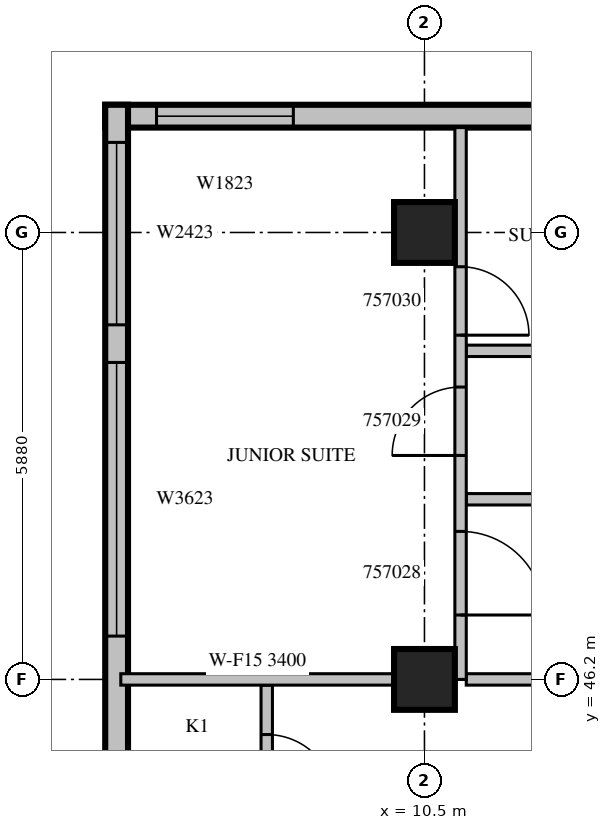
"""IFC4 building model, lengths in metres.
Left out: names, types, materials, properties, quantities, classifications, styles, units other than length and angle.
Written with IfcOpenShell. Run it as: python <this file> out.ifc"""

import sys

from ifc_helpers import new_model, si_unit, direction, frame, frame_2d, origin, origin_2d, place, context, subcontext, project, spatial, rectangle, extrude, source, transform, mapped, element, fill, save


model = new_model("IFC4")
c1 = context("Model", 3, precision=1e-05, world=origin(), true_north=direction((0.0, 1.0)))
c2 = subcontext(c1, "Body", "Model", "MODEL_VIEW")
j1 = project(units=[si_unit("LENGTHUNIT", "METRE"), si_unit("PLANEANGLEUNIT", "RADIAN")], contexts=[c1])
p1 = place(None, origin())
s1 = spatial("IfcSite", under=j1, at=p1, CompositionType="ELEMENT")
p2 = place(p1, origin())
s2 = spatial("IfcBuilding", under=s1, at=p2, CompositionType="ELEMENT")
p3 = place(p2, frame((0.0, 0.0, 250.0)))
s3 = spatial("IfcBuildingStorey", under=s2, at=p3, CompositionType="ELEMENT", Elevation=250.0)
m1 = source(origin(), c2, "Body", "SweptSolid", [
    extrude(rectangle(XDim=0.8, YDim=0.8, at=origin_2d()), origin(), (0.0, 0.0, 1.0), 3.8),
])
for number, where, z_axis, x_axis in (
    (1, (10.5, 46.2, 0.0), (0.0, 0.0, 1.0), (1.0, 0.0, 0.0)),
    (2, (10.5, 52.08, 0.0), (0.0, 0.0, 1.0), (1.0, 0.0, 0.0)),
):
    element("IfcColumn", number, at=place(p3, frame(where, z_axis=z_axis, x_axis=x_axis)), inside=s3, PredefinedType="COLUMN", context=c2, shape_type="MappedRepresentation", body=[
        mapped(m1, transform((0.0, 0.0, 0.0), scale=1.0)),
    ])
m2 = source(origin(), c2, "Body", "SweptSolid", [
    extrude(rectangle(XDim=10.5, YDim=0.3, at=frame_2d((5.25, 0.0))), origin(), (0.0, 0.0, 1.0), 3.4),
])
p4 = place(p3, frame((16.8, 53.61, 0.0), z_axis=(0.0, 0.0, 1.0), x_axis=(-1.0, 0.0, 0.0)))
e3 = element("IfcWall", 3, at=p4, inside=s3, PredefinedType="STANDARD", context=c2, shape_type="MappedRepresentation", body=[
    mapped(m2, transform((0.0, 0.0, 0.0), scale=1.0)),
])
m3 = source(origin(), c2, "Body", "SweptSolid", [
    extrude(rectangle(XDim=1.2, YDim=2.3, at=frame_2d((0.6, 1.15))), frame((0.0, 0.16, 0.0), z_axis=(0.0, -1.0, 0.0), x_axis=(1.0, 0.0, 0.0)), (0.0, 0.0, 1.0), 0.32),
])
p5 = place(p4, frame((2.15, 0.0, 0.6)))
e4 = element("IfcOpeningElement", 4, at=p5, cuts=e3, PredefinedType="OPENING", context=c2, shape_type="MappedRepresentation", body=[
    mapped(m3, transform((0.0, 0.0, 0.0), scale=1.0)),
])
m4 = source(origin(), c2, "Body", "SweptSolid", [
    extrude(rectangle(XDim=1.8, YDim=2.3, at=frame_2d((0.9, 1.15))), frame((0.0, 0.16, 0.0), z_axis=(0.0, -1.0, 0.0), x_axis=(1.0, 0.0, 0.0)), (0.0, 0.0, 1.0), 0.32),
])
p6 = place(p4, frame((8.025, 0.0, 0.6)))
e5 = element("IfcOpeningElement", 5, at=p6, cuts=e3, PredefinedType="OPENING", context=c2, shape_type="MappedRepresentation", body=[
    mapped(m4, transform((0.0, 0.0, 0.0), scale=1.0)),
])
m5 = source(origin(), c2, "Body", "SweptSolid", [
    extrude(rectangle(XDim=9.91, YDim=0.3, at=frame_2d((4.955, 0.0))), origin(), (0.0, 0.0, 1.0), 3.4),
])
p7 = place(p3, frame((6.45, 53.76, 0.0), z_axis=(0.0, 0.0, 1.0), x_axis=(0.0, -1.0, 0.0)))
e6 = element("IfcWall", 6, at=p7, inside=s3, PredefinedType="STANDARD", context=c2, shape_type="MappedRepresentation", body=[
    mapped(m5, transform((0.0, 0.0, 0.0), scale=1.0)),
])
m6 = source(origin(), c2, "Body", "SweptSolid", [
    extrude(rectangle(XDim=3.6, YDim=2.3, at=frame_2d((1.8, 1.15))), frame((0.0, 0.16, 0.0), z_axis=(0.0, -1.0, 0.0), x_axis=(1.0, 0.0, 0.0)), (0.0, 0.0, 1.0), 0.32),
])
p8 = place(p7, frame((3.39, 0.0, 0.6)))
e7 = element("IfcOpeningElement", 7, at=p8, cuts=e6, PredefinedType="OPENING", context=c2, shape_type="MappedRepresentation", body=[
    mapped(m6, transform((0.0, 0.0, 0.0), scale=1.0)),
])
m7 = source(origin(), c2, "Body", "SweptSolid", [
    extrude(rectangle(XDim=2.4, YDim=2.3, at=frame_2d((1.2, 1.15))), frame((0.0, 0.16, 0.0), z_axis=(0.0, -1.0, 0.0), x_axis=(1.0, 0.0, 0.0)), (0.0, 0.0, 1.0), 0.32),
])
p9 = place(p7, frame((0.495, 0.0, 0.6)))
e8 = element("IfcOpeningElement", 8, at=p9, cuts=e6, PredefinedType="OPENING", context=c2, shape_type="MappedRepresentation", body=[
    mapped(m7, transform((0.0, 0.0, 0.0), scale=1.0)),
])
m8 = source(origin(), c2, "Body", "SweptSolid", [
    extrude(rectangle(XDim=2.2, YDim=0.15, at=frame_2d((1.1, 0.0))), origin(), (0.0, 0.0, 1.0), 3.4),
])
p10 = place(p3, frame((8.425, 43.925, 0.0), z_axis=(0.0, 0.0, 1.0), x_axis=(0.0, 1.0, 0.0)))
e9 = element("IfcWall", 9, at=p10, inside=s3, PredefinedType="PARTITIONING", context=c2, shape_type="MappedRepresentation", body=[
    mapped(m8, transform((0.0, 0.0, 0.0), scale=1.0)),
])
m9 = source(origin(), c2, "Body", "SweptSolid", [
    extrude(rectangle(XDim=0.9, YDim=2.1, at=frame_2d((0.45, 1.05))), frame((0.0, 0.085, 0.0), z_axis=(0.0, -1.0, 0.0), x_axis=(1.0, 0.0, 0.0)), (0.0, 0.0, 1.0), 0.17),
])
p11 = place(p10, frame((0.65, 0.0, 0.0)))
e10 = element("IfcOpeningElement", 10, at=p11, cuts=e9, PredefinedType="OPENING", context=c2, shape_type="MappedRepresentation", body=[
    mapped(m9, transform((0.0, 0.0, 0.0), scale=1.0)),
])
m10 = source(origin(), c2, "Body", "SweptSolid", [
    extrude(rectangle(XDim=3.95, YDim=0.15, at=frame_2d((1.975, 0.0))), origin(), (0.0, 0.0, 1.0), 3.4),
])
for number, where, z_axis, x_axis in (
    (11, (15.0, 48.57, 0.0), (0.0, 0.0, 1.0), (-1.0, 0.0, 0.0)),
    (12, (15.0, 50.523, 0.0), (0.0, 0.0, 1.0), (-1.0, 0.0, 0.0)),
):
    element("IfcWall", number, at=place(p3, frame(where, z_axis=z_axis, x_axis=x_axis)), inside=s3, PredefinedType="PARTITIONING", context=c2, shape_type="MappedRepresentation", body=[
        mapped(m10, transform((0.0, 0.0, 0.0), scale=1.0)),
    ])
m11 = source(origin(), c2, "Body", "SweptSolid", [
    extrude(rectangle(XDim=3.596, YDim=0.15, at=frame_2d((1.798, 0.0))), origin(), (0.0, 0.0, 1.0), 3.4),
])
p12 = place(p3, frame((10.101, 46.2, 0.0), z_axis=(0.0, 0.0, 1.0), x_axis=(-1.0, 0.0, 0.0)))
e13 = element("IfcWall", 13, at=p12, inside=s3, PredefinedType="PARTITIONING", context=c2, shape_type="MappedRepresentation", body=[
    mapped(m11, transform((0.0, 0.0, 0.0), scale=1.0)),
])
p13 = place(p3, frame((15.0, 46.2, 0.0), z_axis=(0.0, 0.0, 1.0), x_axis=(-1.0, 0.0, 0.0)))
e14 = element("IfcWall", 14, at=p13, inside=s3, PredefinedType="PARTITIONING", context=c2, shape_type="MappedRepresentation", body=[
    mapped(m10, transform((0.0, 0.0, 0.0), scale=1.0)),
])
m12 = source(origin(), c2, "Body", "SweptSolid", [
    extrude(rectangle(XDim=7.26, YDim=0.15, at=frame_2d((3.63, 0.0))), origin(), (0.0, 0.0, 1.0), 3.4),
])
p14 = place(p3, frame((10.975, 46.2, 0.0), z_axis=(0.0, 0.0, 1.0), x_axis=(0.0, 1.0, 0.0)))
e15 = element("IfcWall", 15, at=p14, inside=s3, PredefinedType="PARTITIONING", context=c2, shape_type="MappedRepresentation", body=[
    mapped(m12, transform((0.0, 0.0, 0.0), scale=1.0)),
])
m13 = source(origin(), c2, "Body", "SweptSolid", [
    extrude(rectangle(XDim=1.1, YDim=2.1, at=frame_2d((0.55, 1.05))), frame((0.0, 0.085, 0.0), z_axis=(0.0, -1.0, 0.0), x_axis=(1.0, 0.0, 0.0)), (0.0, 0.0, 1.0), 0.17),
])
p15 = place(p14, frame((0.847, 0.0, 0.0)))
e16 = element("IfcOpeningElement", 16, at=p15, cuts=e15, PredefinedType="OPENING", context=c2, shape_type="MappedRepresentation", body=[
    mapped(m13, transform((0.0, 0.0, 0.0), scale=1.0)),
])
p16 = place(p14, frame((2.946, 0.0, 0.0)))
e17 = element("IfcOpeningElement", 17, at=p16, cuts=e15, PredefinedType="OPENING", context=c2, shape_type="MappedRepresentation", body=[
    mapped(m9, transform((0.0, 0.0, 0.0), scale=1.0)),
])
p17 = place(p14, frame((4.529, 0.0, 0.0)))
e18 = element("IfcOpeningElement", 18, at=p17, cuts=e15, PredefinedType="OPENING", context=c2, shape_type="MappedRepresentation", body=[
    mapped(m9, transform((0.0, 0.0, 0.0), scale=1.0)),
])
m14 = source(origin(), c2, "Body", "SweptSolid", [
    extrude(rectangle(XDim=1.8, YDim=2.3, at=frame_2d((0.9, 1.15))), frame((0.0, 0.03, 0.0), z_axis=(0.0, -1.0, 0.0), x_axis=(1.0, 0.0, 0.0)), (0.0, 0.0, 1.0), 0.06),
])
p18 = place(p6, origin())
e19 = element("IfcWindow", 19, at=p18, inside=s3, PartitioningType="SINGLE_PANEL", PredefinedType="WINDOW", context=c2, shape_type="MappedRepresentation", body=[
    mapped(m14, transform((0.0, 0.0, 0.0), scale=1.0)),
])
fill(e5, e19)
m15 = source(origin(), c2, "Body", "SweptSolid", [
    extrude(rectangle(XDim=3.6, YDim=2.3, at=frame_2d((1.8, 1.15))), frame((0.0, 0.03, 0.0), z_axis=(0.0, -1.0, 0.0), x_axis=(1.0, 0.0, 0.0)), (0.0, 0.0, 1.0), 0.06),
])
p19 = place(p8, origin())
e20 = element("IfcWindow", 20, at=p19, inside=s3, PartitioningType="SINGLE_PANEL", PredefinedType="WINDOW", context=c2, shape_type="MappedRepresentation", body=[
    mapped(m15, transform((0.0, 0.0, 0.0), scale=1.0)),
])
fill(e7, e20)
m16 = source(origin(), c2, "Body", "SweptSolid", [
    extrude(rectangle(XDim=2.4, YDim=2.3, at=frame_2d((1.2, 1.15))), frame((0.0, 0.03, 0.0), z_axis=(0.0, -1.0, 0.0), x_axis=(1.0, 0.0, 0.0)), (0.0, 0.0, 1.0), 0.06),
])
p20 = place(p9, origin())
e21 = element("IfcWindow", 21, at=p20, inside=s3, PartitioningType="SINGLE_PANEL", PredefinedType="WINDOW", context=c2, shape_type="MappedRepresentation", body=[
    mapped(m16, transform((0.0, 0.0, 0.0), scale=1.0)),
])
fill(e8, e21)
m17 = source(origin(), c2, "Body", "SweptSolid", [
    extrude(rectangle(XDim=0.9, YDim=2.1, at=frame_2d((0.45, 1.05))), frame((0.0, 0.025, 0.0), z_axis=(0.0, -1.0, 0.0), x_axis=(1.0, 0.0, 0.0)), (0.0, 0.0, 1.0), 0.05),
])
p21 = place(p11, origin())
e22 = element("IfcDoor", 22, at=p21, inside=s3, OperationType="SINGLE_SWING_RIGHT", PredefinedType="DOOR", context=c2, shape_type="MappedRepresentation", body=[
    mapped(m17, transform((0.0, 0.0, 0.0), scale=1.0)),
])
fill(e10, e22)
m18 = source(origin(), c2, "Body", "SweptSolid", [
    extrude(rectangle(XDim=1.1, YDim=2.1, at=frame_2d((0.55, 1.05))), frame((0.0, 0.025, 0.0), z_axis=(0.0, -1.0, 0.0), x_axis=(1.0, 0.0, 0.0)), (0.0, 0.0, 1.0), 0.05),
])
p22 = place(p15, origin())
e23 = element("IfcDoor", 23, at=p22, inside=s3, OperationType="SINGLE_SWING_RIGHT", PredefinedType="DOOR", context=c2, shape_type="MappedRepresentation", body=[
    mapped(m18, transform((0.0, 0.0, 0.0), scale=1.0)),
])
fill(e16, e23)
p23 = place(p16, origin())
e24 = element("IfcDoor", 24, at=p23, inside=s3, OperationType="SINGLE_SWING_LEFT", PredefinedType="DOOR", context=c2, shape_type="MappedRepresentation", body=[
    mapped(m17, transform((0.0, 0.0, 0.0), scale=1.0)),
])
fill(e17, e24)
p24 = place(p17, origin())
e25 = element("IfcDoor", 25, at=p24, inside=s3, OperationType="SINGLE_SWING_RIGHT", PredefinedType="DOOR", context=c2, shape_type="MappedRepresentation", body=[
    mapped(m17, transform((0.0, 0.0, 0.0), scale=1.0)),
])
fill(e18, e25)
save(model, sys.argv[1])
